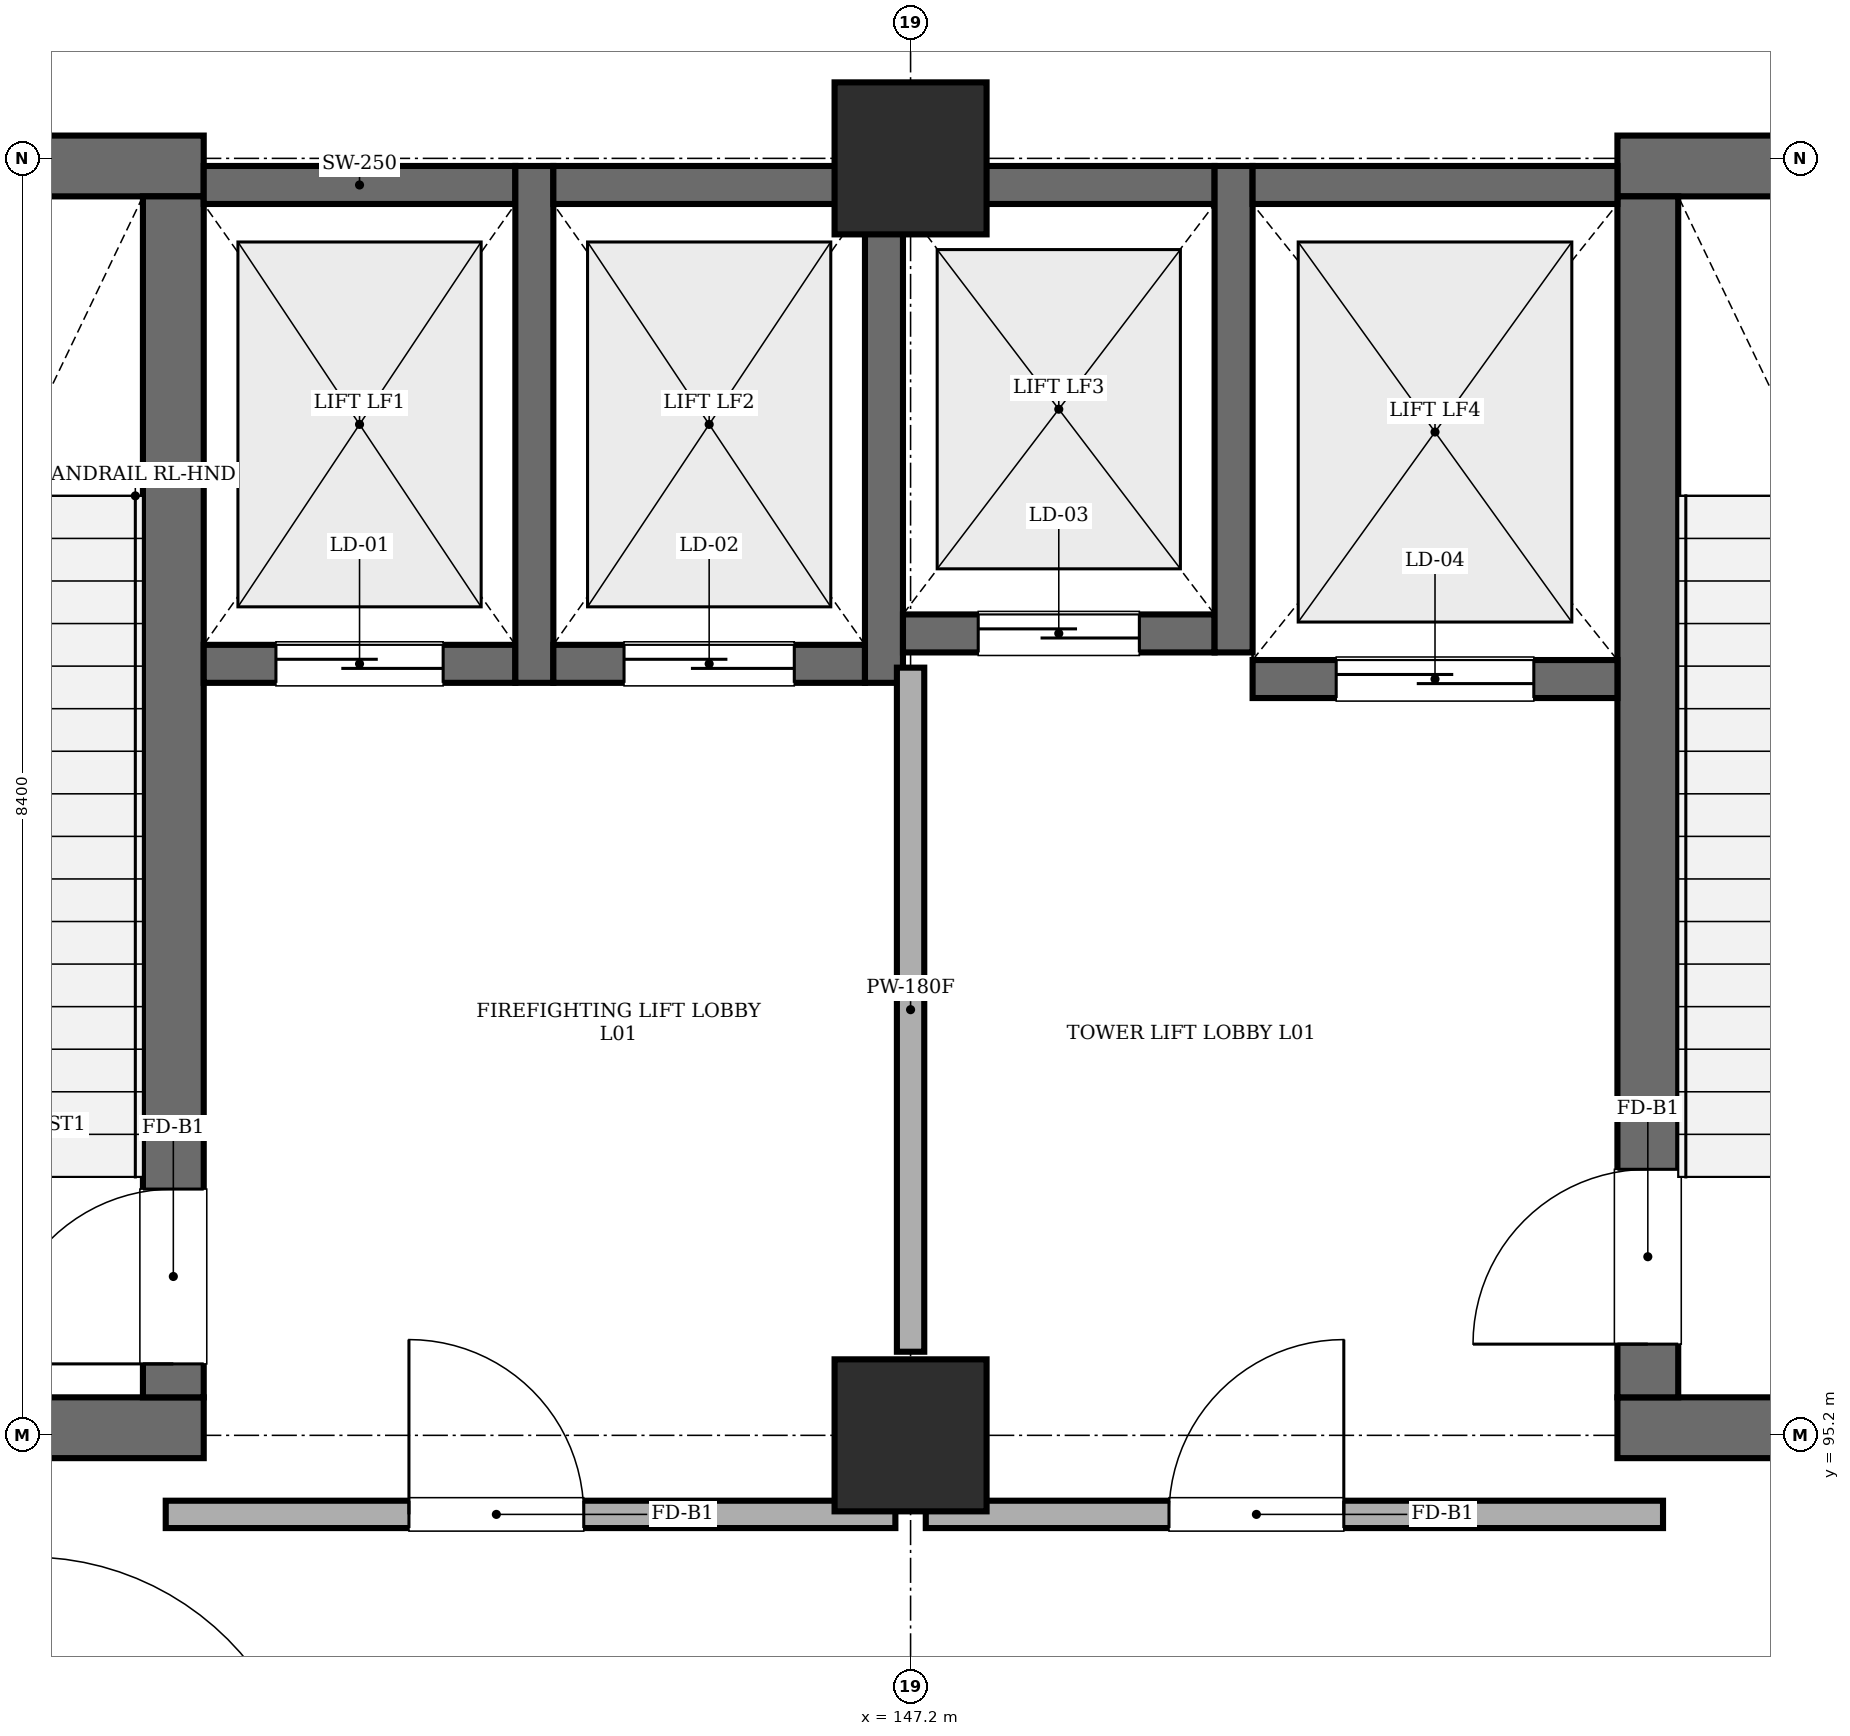
"""IFC4 building model, lengths in metres.
Left out: names, types, materials, properties, quantities, classifications, styles, units other than length and angle.
Written with IfcOpenShell. Run it as: python <this file> out.ifc"""

import sys

from ifc_helpers import new_model, si_unit, direction, frame, frame_2d, origin, origin_2d, place, context, subcontext, project, spatial, rectangle, extrude, element, fill, save


model = new_model("IFC4")
c1 = context("Model", 3, precision=1e-05, world=origin(), true_north=direction((0.0, 1.0)))
c2 = subcontext(c1, "Body", "Model", "MODEL_VIEW")
j1 = project(units=[si_unit("LENGTHUNIT", "METRE"), si_unit("PLANEANGLEUNIT", "RADIAN")], contexts=[c1])
p1 = place(None, origin())
s1 = spatial("IfcSite", under=j1, at=p1, CompositionType="ELEMENT")
p2 = place(p1, origin())
s2 = spatial("IfcBuilding", under=s1, at=p2, CompositionType="ELEMENT")
p3 = place(p2, origin())
s3 = spatial("IfcBuildingStorey", under=s2, at=p3, CompositionType="ELEMENT", Elevation=0.0)
for number, where, z_axis, x_axis in (
    (1, (147.2, 95.2, 0.0), (0.0, 0.0, 1.0), (1.0, 0.0, 0.0)),
    (2, (147.2, 103.6, 0.0), (0.0, 0.0, 1.0), (1.0, 0.0, 0.0)),
):
    element("IfcColumn", number, at=place(p3, frame(where, z_axis=z_axis, x_axis=x_axis)), inside=s3, PredefinedType="COLUMN", context=c2, shape_type="SweptSolid", body=[
        extrude(rectangle(XDim=1.0, YDim=1.0, at=origin_2d()), origin(), (0.0, 0.0, 1.0), 5.18),
    ])
for number, where, z_axis, x_axis in (
    (3, (138.65, 95.25, 0.0), (0.0, 0.0, 1.0), (1.0, 0.0, 0.0)),
    (4, (138.65, 103.55, 0.0), (0.0, 0.0, 1.0), (1.0, 0.0, 0.0)),
):
    element("IfcWall", number, at=place(p3, frame(where, z_axis=z_axis, x_axis=x_axis)), inside=s3, PredefinedType="SHEAR", context=c2, shape_type="SweptSolid", body=[
        extrude(rectangle(XDim=3.9, YDim=0.4, at=frame_2d((1.95, 0.0))), origin(), (0.0, 0.0, 1.0), 5.18),
    ])
p4 = place(p3, frame((142.35, 95.45, 0.0), z_axis=(0.0, 0.0, 1.0), x_axis=(0.0, 1.0, 0.0)))
e5 = element("IfcWall", 5, at=p4, inside=s3, PredefinedType="SHEAR", context=c2, shape_type="SweptSolid", body=[
    extrude(rectangle(XDim=7.9, YDim=0.4, at=frame_2d((3.95, 0.0))), origin(), (0.0, 0.0, 1.0), 5.18),
])
p5 = place(p4, frame((0.22, 0.0, 0.0)))
e6 = element("IfcOpeningElement", 6, at=p5, cuts=e5, PredefinedType="OPENING", context=c2, shape_type="SweptSolid", body=[
    extrude(rectangle(XDim=1.15, YDim=2.15, at=frame_2d((0.575, 1.075))), frame((0.0, 0.21, 0.0), z_axis=(0.0, -1.0, 0.0), x_axis=(1.0, 0.0, 0.0)), (0.0, 0.0, 1.0), 0.42),
])
for number, where, z_axis, x_axis in (
    (7, (151.85, 95.25, 0.0), (0.0, 0.0, 1.0), (1.0, 0.0, 0.0)),
    (8, (151.85, 103.55, 0.0), (0.0, 0.0, 1.0), (1.0, 0.0, 0.0)),
):
    element("IfcWall", number, at=place(p3, frame(where, z_axis=z_axis, x_axis=x_axis)), inside=s3, PredefinedType="SHEAR", context=c2, shape_type="SweptSolid", body=[
        extrude(rectangle(XDim=3.9, YDim=0.4, at=frame_2d((1.95, 0.0))), origin(), (0.0, 0.0, 1.0), 5.18),
    ])
p6 = place(p3, frame((152.05, 95.45, 0.0), z_axis=(0.0, 0.0, 1.0), x_axis=(0.0, 1.0, 0.0)))
e9 = element("IfcWall", 9, at=p6, inside=s3, PredefinedType="SHEAR", context=c2, shape_type="SweptSolid", body=[
    extrude(rectangle(XDim=7.9, YDim=0.4, at=frame_2d((3.95, 0.0))), origin(), (0.0, 0.0, 1.0), 5.18),
])
p7 = place(p6, frame((0.35, 0.0, 0.0)))
e10 = element("IfcOpeningElement", 10, at=p7, cuts=e9, PredefinedType="OPENING", context=c2, shape_type="SweptSolid", body=[
    extrude(rectangle(XDim=1.15, YDim=2.15, at=frame_2d((0.575, 1.075))), frame((0.0, 0.21, 0.0), z_axis=(0.0, -1.0, 0.0), x_axis=(1.0, 0.0, 0.0)), (0.0, 0.0, 1.0), 0.42),
])
p8 = place(p3, frame((142.55, 100.275, 0.0), z_axis=(0.0, 0.0, 1.0), x_axis=(1.0, 0.0, 0.0)))
e11 = element("IfcWall", 11, at=p8, inside=s3, PredefinedType="SHEAR", context=c2, shape_type="SweptSolid", body=[
    extrude(rectangle(XDim=2.05, YDim=0.25, at=frame_2d((1.025, 0.0))), origin(), (0.0, 0.0, 1.0), 5.18),
])
p9 = place(p8, frame((0.475, 0.0, 0.0)))
e12 = element("IfcOpeningElement", 12, at=p9, cuts=e11, PredefinedType="OPENING", context=c2, shape_type="SweptSolid", body=[
    extrude(rectangle(XDim=1.1, YDim=2.15, at=frame_2d((0.55, 1.075))), frame((0.0, 0.135, 0.0), z_axis=(0.0, -1.0, 0.0), x_axis=(1.0, 0.0, 0.0)), (0.0, 0.0, 1.0), 0.27),
])
p10 = place(p3, frame((142.55, 103.425, 0.0), z_axis=(0.0, 0.0, 1.0), x_axis=(1.0, 0.0, 0.0)))
e13 = element("IfcWall", 13, at=p10, inside=s3, PredefinedType="SHEAR", context=c2, shape_type="SweptSolid", body=[
    extrude(rectangle(XDim=2.05, YDim=0.25, at=frame_2d((1.025, 0.0))), origin(), (0.0, 0.0, 1.0), 5.18),
])
p11 = place(p3, frame((144.725, 100.15, 0.0), z_axis=(0.0, 0.0, 1.0), x_axis=(0.0, 1.0, 0.0)))
e14 = element("IfcWall", 14, at=p11, inside=s3, PredefinedType="SHEAR", context=c2, shape_type="SweptSolid", body=[
    extrude(rectangle(XDim=3.4, YDim=0.25, at=frame_2d((1.7, 0.0))), origin(), (0.0, 0.0, 1.0), 5.18),
])
p12 = place(p3, frame((144.85, 100.275, 0.0), z_axis=(0.0, 0.0, 1.0), x_axis=(1.0, 0.0, 0.0)))
e15 = element("IfcWall", 15, at=p12, inside=s3, PredefinedType="SHEAR", context=c2, shape_type="SweptSolid", body=[
    extrude(rectangle(XDim=2.05, YDim=0.25, at=frame_2d((1.025, 0.0))), origin(), (0.0, 0.0, 1.0), 5.18),
])
p13 = place(p12, frame((0.465, 0.0, 0.0)))
e16 = element("IfcOpeningElement", 16, at=p13, cuts=e15, PredefinedType="OPENING", context=c2, shape_type="SweptSolid", body=[
    extrude(rectangle(XDim=1.12, YDim=2.15, at=frame_2d((0.56, 1.075))), frame((0.0, 0.135, 0.0), z_axis=(0.0, -1.0, 0.0), x_axis=(1.0, 0.0, 0.0)), (0.0, 0.0, 1.0), 0.27),
])
p14 = place(p3, frame((144.85, 103.425, 0.0), z_axis=(0.0, 0.0, 1.0), x_axis=(1.0, 0.0, 0.0)))
e17 = element("IfcWall", 17, at=p14, inside=s3, PredefinedType="SHEAR", context=c2, shape_type="SweptSolid", body=[
    extrude(rectangle(XDim=2.05, YDim=0.25, at=frame_2d((1.025, 0.0))), origin(), (0.0, 0.0, 1.0), 5.18),
])
p15 = place(p3, frame((147.025, 100.15, 0.0), z_axis=(0.0, 0.0, 1.0), x_axis=(0.0, 1.0, 0.0)))
e18 = element("IfcWall", 18, at=p15, inside=s3, PredefinedType="SHEAR", context=c2, shape_type="SweptSolid", body=[
    extrude(rectangle(XDim=3.4, YDim=0.25, at=frame_2d((1.7, 0.0))), origin(), (0.0, 0.0, 1.0), 5.18),
])
p16 = place(p3, frame((147.15, 100.475, 0.0), z_axis=(0.0, 0.0, 1.0), x_axis=(1.0, 0.0, 0.0)))
e19 = element("IfcWall", 19, at=p16, inside=s3, PredefinedType="SHEAR", context=c2, shape_type="SweptSolid", body=[
    extrude(rectangle(XDim=2.05, YDim=0.25, at=frame_2d((1.025, 0.0))), origin(), (0.0, 0.0, 1.0), 5.18),
])
p17 = place(p16, frame((0.495, 0.0, 0.0)))
e20 = element("IfcOpeningElement", 20, at=p17, cuts=e19, PredefinedType="OPENING", context=c2, shape_type="SweptSolid", body=[
    extrude(rectangle(XDim=1.06, YDim=2.15, at=frame_2d((0.53, 1.075))), frame((0.0, 0.135, 0.0), z_axis=(0.0, -1.0, 0.0), x_axis=(1.0, 0.0, 0.0)), (0.0, 0.0, 1.0), 0.27),
])
p18 = place(p3, frame((147.15, 103.425, 0.0), z_axis=(0.0, 0.0, 1.0), x_axis=(1.0, 0.0, 0.0)))
e21 = element("IfcWall", 21, at=p18, inside=s3, PredefinedType="SHEAR", context=c2, shape_type="SweptSolid", body=[
    extrude(rectangle(XDim=2.05, YDim=0.25, at=frame_2d((1.025, 0.0))), origin(), (0.0, 0.0, 1.0), 5.18),
])
p19 = place(p3, frame((149.325, 100.35, 0.0), z_axis=(0.0, 0.0, 1.0), x_axis=(0.0, 1.0, 0.0)))
e22 = element("IfcWall", 22, at=p19, inside=s3, PredefinedType="SHEAR", context=c2, shape_type="SweptSolid", body=[
    extrude(rectangle(XDim=3.2, YDim=0.25, at=frame_2d((1.6, 0.0))), origin(), (0.0, 0.0, 1.0), 5.18),
])
p20 = place(p3, frame((149.45, 100.175, 0.0), z_axis=(0.0, 0.0, 1.0), x_axis=(1.0, 0.0, 0.0)))
e23 = element("IfcWall", 23, at=p20, inside=s3, PredefinedType="SHEAR", context=c2, shape_type="SweptSolid", body=[
    extrude(rectangle(XDim=2.4, YDim=0.25, at=frame_2d((1.2, 0.0))), origin(), (0.0, 0.0, 1.0), 5.18),
])
p21 = place(p20, frame((0.55, 0.0, 0.0)))
e24 = element("IfcOpeningElement", 24, at=p21, cuts=e23, PredefinedType="OPENING", context=c2, shape_type="SweptSolid", body=[
    extrude(rectangle(XDim=1.3, YDim=2.25, at=frame_2d((0.65, 1.125))), frame((0.0, 0.135, 0.0), z_axis=(0.0, -1.0, 0.0), x_axis=(1.0, 0.0, 0.0)), (0.0, 0.0, 1.0), 0.27),
])
p22 = place(p3, frame((149.45, 103.425, 0.0), z_axis=(0.0, 0.0, 1.0), x_axis=(1.0, 0.0, 0.0)))
e25 = element("IfcWall", 25, at=p22, inside=s3, PredefinedType="SHEAR", context=c2, shape_type="SweptSolid", body=[
    extrude(rectangle(XDim=2.4, YDim=0.25, at=frame_2d((1.2, 0.0))), origin(), (0.0, 0.0, 1.0), 5.18),
])
p23 = place(p3, frame((142.3, 94.68, 0.0), z_axis=(0.0, 0.0, 1.0), x_axis=(1.0, 0.0, 0.0)))
e26 = element("IfcWall", 26, at=p23, inside=s3, PredefinedType="STANDARD", context=c2, shape_type="SweptSolid", body=[
    extrude(rectangle(XDim=4.8, YDim=0.18, at=frame_2d((2.4, 0.0))), origin(), (0.0, 0.0, 1.0), 5.18),
])
p24 = place(p23, frame((1.6, 0.0, 0.0)))
e27 = element("IfcOpeningElement", 27, at=p24, cuts=e26, PredefinedType="OPENING", context=c2, shape_type="SweptSolid", body=[
    extrude(rectangle(XDim=1.15, YDim=2.15, at=frame_2d((0.575, 1.075))), frame((0.0, 0.1, 0.0), z_axis=(0.0, -1.0, 0.0), x_axis=(1.0, 0.0, 0.0)), (0.0, 0.0, 1.0), 0.2),
])
p25 = place(p3, frame((147.3, 94.68, 0.0), z_axis=(0.0, 0.0, 1.0), x_axis=(1.0, 0.0, 0.0)))
e28 = element("IfcWall", 28, at=p25, inside=s3, PredefinedType="STANDARD", context=c2, shape_type="SweptSolid", body=[
    extrude(rectangle(XDim=4.85, YDim=0.18, at=frame_2d((2.425, 0.0))), origin(), (0.0, 0.0, 1.0), 5.18),
])
p26 = place(p25, frame((1.6, 0.0, 0.0)))
e29 = element("IfcOpeningElement", 29, at=p26, cuts=e28, PredefinedType="OPENING", context=c2, shape_type="SweptSolid", body=[
    extrude(rectangle(XDim=1.15, YDim=2.15, at=frame_2d((0.575, 1.075))), frame((0.0, 0.1, 0.0), z_axis=(0.0, -1.0, 0.0), x_axis=(1.0, 0.0, 0.0)), (0.0, 0.0, 1.0), 0.2),
])
p27 = place(p3, frame((147.2, 95.75, 0.0), z_axis=(0.0, 0.0, 1.0), x_axis=(0.0, 1.0, 0.0)))
e30 = element("IfcWall", 30, at=p27, inside=s3, PredefinedType="STANDARD", context=c2, shape_type="SweptSolid", body=[
    extrude(rectangle(XDim=4.5, YDim=0.18, at=frame_2d((2.25, 0.0))), origin(), (0.0, 0.0, 1.0), 4.43),
])
p28 = place(p24, origin())
e31 = element("IfcDoor", 31, at=p28, inside=s3, OperationType="SINGLE_SWING_LEFT", PredefinedType="DOOR", context=c2, shape_type="SweptSolid", body=[
    extrude(rectangle(XDim=1.15, YDim=2.15, at=frame_2d((0.575, 1.075))), frame((0.0, 0.025, 0.0), z_axis=(0.0, -1.0, 0.0), x_axis=(1.0, 0.0, 0.0)), (0.0, 0.0, 1.0), 0.05),
])
fill(e27, e31)
p29 = place(p26, origin())
e32 = element("IfcDoor", 32, at=p29, inside=s3, OperationType="SINGLE_SWING_RIGHT", PredefinedType="DOOR", context=c2, shape_type="SweptSolid", body=[
    extrude(rectangle(XDim=1.15, YDim=2.15, at=frame_2d((0.575, 1.075))), frame((0.0, 0.025, 0.0), z_axis=(0.0, -1.0, 0.0), x_axis=(1.0, 0.0, 0.0)), (0.0, 0.0, 1.0), 0.05),
])
fill(e29, e32)
p30 = place(p5, origin())
e33 = element("IfcDoor", 33, at=p30, inside=s3, OperationType="SINGLE_SWING_LEFT", PredefinedType="DOOR", context=c2, shape_type="SweptSolid", body=[
    extrude(rectangle(XDim=1.15, YDim=2.15, at=frame_2d((0.575, 1.075))), frame((0.0, 0.025, 0.0), z_axis=(0.0, -1.0, 0.0), x_axis=(1.0, 0.0, 0.0)), (0.0, 0.0, 1.0), 0.05),
])
fill(e6, e33)
p31 = place(p7, origin())
e34 = element("IfcDoor", 34, at=p31, inside=s3, OperationType="SINGLE_SWING_LEFT", PredefinedType="DOOR", context=c2, shape_type="SweptSolid", body=[
    extrude(rectangle(XDim=1.15, YDim=2.15, at=frame_2d((0.575, 1.075))), frame((0.0, 0.025, 0.0), z_axis=(0.0, -1.0, 0.0), x_axis=(1.0, 0.0, 0.0)), (0.0, 0.0, 1.0), 0.05),
])
fill(e10, e34)
p32 = place(p9, origin())
e35 = element("IfcDoor", 35, at=p32, inside=s3, OperationType="SLIDING_TO_LEFT", PredefinedType="DOOR", context=c2, shape_type="SweptSolid", body=[
    extrude(rectangle(XDim=1.1, YDim=2.15, at=frame_2d((0.55, 1.075))), frame((0.0, 0.025, 0.0), z_axis=(0.0, -1.0, 0.0), x_axis=(1.0, 0.0, 0.0)), (0.0, 0.0, 1.0), 0.05),
])
fill(e12, e35)
p33 = place(p13, origin())
e36 = element("IfcDoor", 36, at=p33, inside=s3, OperationType="SLIDING_TO_LEFT", PredefinedType="DOOR", context=c2, shape_type="SweptSolid", body=[
    extrude(rectangle(XDim=1.12, YDim=2.15, at=frame_2d((0.56, 1.075))), frame((0.0, 0.025, 0.0), z_axis=(0.0, -1.0, 0.0), x_axis=(1.0, 0.0, 0.0)), (0.0, 0.0, 1.0), 0.05),
])
fill(e16, e36)
p34 = place(p17, origin())
e37 = element("IfcDoor", 37, at=p34, inside=s3, OperationType="SLIDING_TO_LEFT", PredefinedType="DOOR", context=c2, shape_type="SweptSolid", body=[
    extrude(rectangle(XDim=1.06, YDim=2.15, at=frame_2d((0.53, 1.075))), frame((0.0, 0.025, 0.0), z_axis=(0.0, -1.0, 0.0), x_axis=(1.0, 0.0, 0.0)), (0.0, 0.0, 1.0), 0.05),
])
fill(e20, e37)
p35 = place(p21, origin())
e38 = element("IfcDoor", 38, at=p35, inside=s3, OperationType="SLIDING_TO_LEFT", PredefinedType="DOOR", context=c2, shape_type="SweptSolid", body=[
    extrude(rectangle(XDim=1.3, YDim=2.25, at=frame_2d((0.65, 1.125))), frame((0.0, 0.025, 0.0), z_axis=(0.0, -1.0, 0.0), x_axis=(1.0, 0.0, 0.0)), (0.0, 0.0, 1.0), 0.05),
])
fill(e24, e38)
save(model, sys.argv[1])
